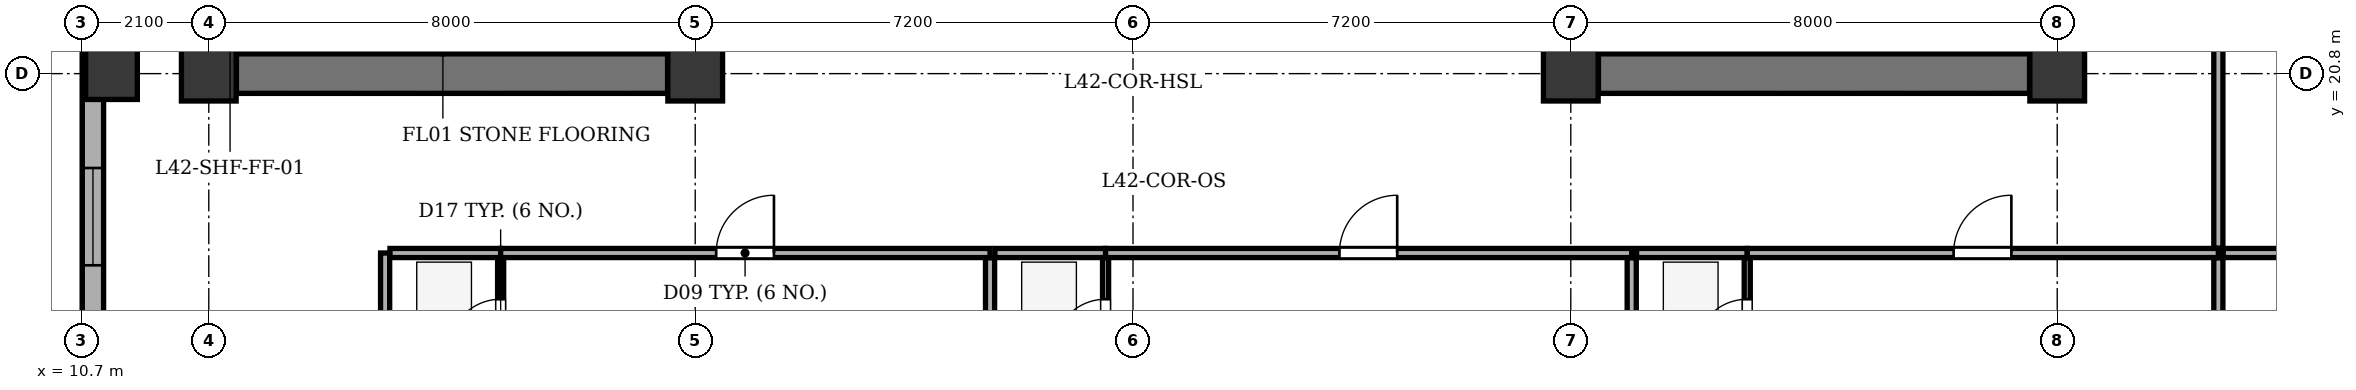
"""IFC4 building model, lengths in metres.
Left out: names, types, materials, properties, quantities, classifications, styles, units other than length and angle.
Written with IfcOpenShell. Run it as: python <this file> out.ifc"""

import sys

from ifc_helpers import new_model, si_unit, direction, frame, frame_2d, origin, origin_2d, place, context, subcontext, project, spatial, rectangle, extrude, element, fill, save


model = new_model("IFC4")
c1 = context("Model", 3, precision=1e-05, world=origin(), true_north=direction((0.0, 1.0)))
c2 = subcontext(c1, "Body", "Model", "MODEL_VIEW")
j1 = project(units=[si_unit("LENGTHUNIT", "METRE"), si_unit("PLANEANGLEUNIT", "RADIAN")], contexts=[c1])
p1 = place(None, origin())
s1 = spatial("IfcSite", under=j1, at=p1, CompositionType="ELEMENT")
p2 = place(p1, origin())
s2 = spatial("IfcBuilding", under=s1, at=p2, CompositionType="ELEMENT")
p3 = place(p2, frame((0.0, 0.0, 165.8)))
s3 = spatial("IfcBuildingStorey", under=s2, at=p3, CompositionType="ELEMENT", Elevation=165.8)
for number, where, z_axis, x_axis in (
    (1, (12.8, 20.8, 0.0), (0.0, 0.0, 1.0), (1.0, 0.0, 0.0)),
    (2, (20.8, 20.8, 0.0), (0.0, 0.0, 1.0), (1.0, 0.0, 0.0)),
    (3, (35.2, 20.8, 0.0), (0.0, 0.0, 1.0), (1.0, 0.0, 0.0)),
    (4, (43.2, 20.8, 0.0), (0.0, 0.0, 1.0), (1.0, 0.0, 0.0)),
):
    element("IfcColumn", number, at=place(p3, frame(where, z_axis=z_axis, x_axis=x_axis)), inside=s3, PredefinedType="COLUMN", context=c2, shape_type="SweptSolid", body=[
        extrude(rectangle(XDim=0.9, YDim=0.9, at=origin_2d()), origin(), (0.0, 0.0, 1.0), 3.5),
    ])
p4 = place(p3, frame((11.2, 20.8, 0.0), z_axis=(0.0, 0.0, 1.0), x_axis=(1.0, 0.0, 0.0)))
e5 = element("IfcColumn", 5, at=p4, inside=s3, PredefinedType="COLUMN", context=c2, shape_type="SweptSolid", body=[
    extrude(rectangle(XDim=0.85, YDim=0.85, at=origin_2d()), origin(), (0.0, 0.0, 1.0), 3.5),
])
p5 = place(p3, frame((10.895, 12.9, 0.0), z_axis=(0.0, 0.0, 1.0), x_axis=(0.0, 1.0, 0.0)))
e6 = element("IfcWall", 6, at=p5, inside=s3, PredefinedType="STANDARD", context=c2, shape_type="SweptSolid", body=[
    extrude(rectangle(XDim=35.0, YDim=0.35, at=frame_2d((17.5, 0.0))), origin(), (0.0, 0.0, 1.0), 2.785),
])
p6 = place(p5, frame((1.652, 0.0, 0.75)))
e7 = element("IfcOpeningElement", 7, at=p6, cuts=e6, PredefinedType="OPENING", context=c2, shape_type="SweptSolid", body=[
    extrude(rectangle(XDim=1.6, YDim=1.75, at=frame_2d((0.8, 0.875))), frame((0.0, 0.185, 0.0), z_axis=(0.0, -1.0, 0.0), x_axis=(1.0, 0.0, 0.0)), (0.0, 0.0, 1.0), 0.37),
])
p7 = place(p5, frame((4.748, 0.0, 0.75)))
e8 = element("IfcOpeningElement", 8, at=p7, cuts=e6, PredefinedType="OPENING", context=c2, shape_type="SweptSolid", body=[
    extrude(rectangle(XDim=1.6, YDim=1.75, at=frame_2d((0.8, 0.875))), frame((0.0, 0.185, 0.0), z_axis=(0.0, -1.0, 0.0), x_axis=(1.0, 0.0, 0.0)), (0.0, 0.0, 1.0), 0.37),
])
p8 = place(p5, frame((10.752, 0.0, 0.75)))
e9 = element("IfcOpeningElement", 9, at=p8, cuts=e6, PredefinedType="OPENING", context=c2, shape_type="SweptSolid", body=[
    extrude(rectangle(XDim=1.6, YDim=1.75, at=frame_2d((0.8, 0.875))), frame((0.0, 0.185, 0.0), z_axis=(0.0, -1.0, 0.0), x_axis=(1.0, 0.0, 0.0)), (0.0, 0.0, 1.0), 0.37),
])
p9 = place(p5, frame((15.998, 0.0, 0.75)))
e10 = element("IfcOpeningElement", 10, at=p9, cuts=e6, PredefinedType="OPENING", context=c2, shape_type="SweptSolid", body=[
    extrude(rectangle(XDim=2.1, YDim=1.75, at=frame_2d((1.05, 0.875))), frame((0.0, 0.185, 0.0), z_axis=(0.0, -1.0, 0.0), x_axis=(1.0, 0.0, 0.0)), (0.0, 0.0, 1.0), 0.37),
])
p10 = place(p5, frame((23.916, 0.0, 0.75)))
e11 = element("IfcOpeningElement", 11, at=p10, cuts=e6, PredefinedType="OPENING", context=c2, shape_type="SweptSolid", body=[
    extrude(rectangle(XDim=1.6, YDim=1.75, at=frame_2d((0.8, 0.875))), frame((0.0, 0.185, 0.0), z_axis=(0.0, -1.0, 0.0), x_axis=(1.0, 0.0, 0.0)), (0.0, 0.0, 1.0), 0.37),
])
p11 = place(p5, frame((29.834, 0.0, 0.75)))
e12 = element("IfcOpeningElement", 12, at=p11, cuts=e6, PredefinedType="OPENING", context=c2, shape_type="SweptSolid", body=[
    extrude(rectangle(XDim=2.1, YDim=1.75, at=frame_2d((1.05, 0.875))), frame((0.0, 0.185, 0.0), z_axis=(0.0, -1.0, 0.0), x_axis=(1.0, 0.0, 0.0)), (0.0, 0.0, 1.0), 0.37),
])
p12 = place(p3, frame((13.255, 20.8, 0.0), z_axis=(0.0, 0.0, 1.0), x_axis=(1.0, 0.0, 0.0)))
e13 = element("IfcWall", 13, at=p12, inside=s3, PredefinedType="SHEAR", context=c2, shape_type="SweptSolid", body=[
    extrude(rectangle(XDim=7.09, YDim=0.65, at=frame_2d((3.545, 0.0))), origin(), (0.0, 0.0, 1.0), 3.2),
])
p13 = place(p3, frame((16.435, 21.135, 0.0), z_axis=(0.0, 0.0, 1.0), x_axis=(0.0, 1.0, 0.0)))
e14 = element("IfcWall", 14, at=p13, inside=s3, PredefinedType="SHEAR", context=c2, shape_type="SweptSolid", body=[
    extrude(rectangle(XDim=12.13, YDim=0.25, at=frame_2d((6.065, 0.0))), origin(), (0.0, 0.0, 1.0), 3.2),
])
p14 = place(p13, frame((0.515, 0.0, 0.0)))
e15 = element("IfcOpeningElement", 15, at=p14, cuts=e14, PredefinedType="OPENING", context=c2, shape_type="SweptSolid", body=[
    extrude(rectangle(XDim=1.2, YDim=2.15, at=frame_2d((0.6, 1.075))), frame((0.0, 0.135, 0.0), z_axis=(0.0, -1.0, 0.0), x_axis=(1.0, 0.0, 0.0)), (0.0, 0.0, 1.0), 0.27),
])
p15 = place(p13, frame((2.665, 0.0, 0.0)))
e16 = element("IfcOpeningElement", 16, at=p15, cuts=e14, PredefinedType="OPENING", context=c2, shape_type="SweptSolid", body=[
    extrude(rectangle(XDim=1.15, YDim=2.15, at=frame_2d((0.575, 1.075))), frame((0.0, 0.135, 0.0), z_axis=(0.0, -1.0, 0.0), x_axis=(1.0, 0.0, 0.0)), (0.0, 0.0, 1.0), 0.27),
])
p16 = place(p3, frame((35.655, 20.8, 0.0), z_axis=(0.0, 0.0, 1.0), x_axis=(1.0, 0.0, 0.0)))
e17 = element("IfcWall", 17, at=p16, inside=s3, PredefinedType="SHEAR", context=c2, shape_type="SweptSolid", body=[
    extrude(rectangle(XDim=7.09, YDim=0.65, at=frame_2d((3.545, 0.0))), origin(), (0.0, 0.0, 1.0), 3.2),
])
p17 = place(p3, frame((39.565, 21.135, 0.0), z_axis=(0.0, 0.0, 1.0), x_axis=(0.0, 1.0, 0.0)))
e18 = element("IfcWall", 18, at=p17, inside=s3, PredefinedType="SHEAR", context=c2, shape_type="SweptSolid", body=[
    extrude(rectangle(XDim=12.13, YDim=0.25, at=frame_2d((6.065, 0.0))), origin(), (0.0, 0.0, 1.0), 3.2),
])
p18 = place(p17, frame((0.515, 0.0, 0.0)))
e19 = element("IfcOpeningElement", 19, at=p18, cuts=e18, PredefinedType="OPENING", context=c2, shape_type="SweptSolid", body=[
    extrude(rectangle(XDim=1.2, YDim=2.15, at=frame_2d((0.6, 1.075))), frame((0.0, 0.135, 0.0), z_axis=(0.0, -1.0, 0.0), x_axis=(1.0, 0.0, 0.0)), (0.0, 0.0, 1.0), 0.27),
])
p19 = place(p17, frame((2.665, 0.0, 0.0)))
e20 = element("IfcOpeningElement", 20, at=p19, cuts=e18, PredefinedType="OPENING", context=c2, shape_type="SweptSolid", body=[
    extrude(rectangle(XDim=1.15, YDim=2.15, at=frame_2d((0.575, 1.075))), frame((0.0, 0.135, 0.0), z_axis=(0.0, -1.0, 0.0), x_axis=(1.0, 0.0, 0.0)), (0.0, 0.0, 1.0), 0.27),
])
p20 = place(p3, frame((15.7, 8.275, 0.0), z_axis=(0.0, 0.0, 1.0), x_axis=(0.0, 1.0, 0.0)))
e21 = element("IfcWall", 21, at=p20, inside=s3, PredefinedType="PARTITIONING", context=c2, shape_type="SweptSolid", body=[
    extrude(rectangle(XDim=9.575, YDim=0.15, at=frame_2d((4.788, 0.0))), origin(), (0.0, 0.0, 1.0), 3.2),
])
p21 = place(p3, frame((15.78, 17.85, 0.0), z_axis=(0.0, 0.0, 1.0), x_axis=(1.0, 0.0, 0.0)))
e22 = element("IfcWall", 22, at=p21, inside=s3, PredefinedType="PARTITIONING", context=c2, shape_type="SweptSolid", body=[
    extrude(rectangle(XDim=1.82, YDim=0.15, at=frame_2d((0.91, 0.0))), origin(), (0.0, 0.0, 1.0), 3.2),
])
p22 = place(p3, frame((17.6, 17.85, 0.0), z_axis=(0.0, 0.0, 1.0), x_axis=(1.0, 0.0, 0.0)))
e23 = element("IfcWall", 23, at=p22, inside=s3, PredefinedType="PARTITIONING", context=c2, shape_type="SweptSolid", body=[
    extrude(rectangle(XDim=8.049, YDim=0.15, at=frame_2d((4.024, 0.0))), origin(), (0.0, 0.0, 1.0), 3.2),
])
p23 = place(p22, frame((3.545, 0.0, 0.0)))
e24 = element("IfcOpeningElement", 24, at=p23, cuts=e23, PredefinedType="OPENING", context=c2, shape_type="SweptSolid", body=[
    extrude(rectangle(XDim=0.95, YDim=2.1, at=frame_2d((0.475, 1.05))), frame((0.0, 0.085, 0.0), z_axis=(0.0, -1.0, 0.0), x_axis=(1.0, 0.0, 0.0)), (0.0, 0.0, 1.0), 0.17),
])
p24 = place(p3, frame((17.6, 15.52, 0.0), z_axis=(0.0, 0.0, 1.0), x_axis=(0.0, 1.0, 0.0)))
e25 = element("IfcWall", 25, at=p24, inside=s3, PredefinedType="PARTITIONING", context=c2, shape_type="SweptSolid", body=[
    extrude(rectangle(XDim=2.25, YDim=0.1, at=frame_2d((1.125, 0.0))), origin(), (0.0, 0.0, 1.0), 3.2),
])
p25 = place(p24, frame((0.72, 0.0, 0.0)))
e26 = element("IfcOpeningElement", 26, at=p25, cuts=e25, PredefinedType="OPENING", context=c2, shape_type="SweptSolid", body=[
    extrude(rectangle(XDim=0.85, YDim=2.05, at=frame_2d((0.425, 1.025))), frame((0.0, 0.06, 0.0), z_axis=(0.0, -1.0, 0.0), x_axis=(1.0, 0.0, 0.0)), (0.0, 0.0, 1.0), 0.12),
])
p26 = place(p3, frame((25.649, 8.275, 0.0), z_axis=(0.0, 0.0, 1.0), x_axis=(0.0, 1.0, 0.0)))
e27 = element("IfcWall", 27, at=p26, inside=s3, PredefinedType="PARTITIONING", context=c2, shape_type="SweptSolid", body=[
    extrude(rectangle(XDim=9.495, YDim=0.15, at=frame_2d((4.748, 0.0))), origin(), (0.0, 0.0, 1.0), 3.2),
])
p27 = place(p3, frame((25.729, 17.85, 0.0), z_axis=(0.0, 0.0, 1.0), x_axis=(1.0, 0.0, 0.0)))
e28 = element("IfcWall", 28, at=p27, inside=s3, PredefinedType="PARTITIONING", context=c2, shape_type="SweptSolid", body=[
    extrude(rectangle(XDim=1.82, YDim=0.15, at=frame_2d((0.91, 0.0))), origin(), (0.0, 0.0, 1.0), 3.2),
])
p28 = place(p3, frame((27.549, 17.85, 0.0), z_axis=(0.0, 0.0, 1.0), x_axis=(1.0, 0.0, 0.0)))
e29 = element("IfcWall", 29, at=p28, inside=s3, PredefinedType="PARTITIONING", context=c2, shape_type="SweptSolid", body=[
    extrude(rectangle(XDim=8.653, YDim=0.15, at=frame_2d((4.326, 0.0))), origin(), (0.0, 0.0, 1.0), 3.2),
])
p29 = place(p28, frame((3.846, 0.0, 0.0)))
e30 = element("IfcOpeningElement", 30, at=p29, cuts=e29, PredefinedType="OPENING", context=c2, shape_type="SweptSolid", body=[
    extrude(rectangle(XDim=0.95, YDim=2.1, at=frame_2d((0.475, 1.05))), frame((0.0, 0.085, 0.0), z_axis=(0.0, -1.0, 0.0), x_axis=(1.0, 0.0, 0.0)), (0.0, 0.0, 1.0), 0.17),
])
p30 = place(p3, frame((27.549, 15.52, 0.0), z_axis=(0.0, 0.0, 1.0), x_axis=(0.0, 1.0, 0.0)))
e31 = element("IfcWall", 31, at=p30, inside=s3, PredefinedType="PARTITIONING", context=c2, shape_type="SweptSolid", body=[
    extrude(rectangle(XDim=2.25, YDim=0.1, at=frame_2d((1.125, 0.0))), origin(), (0.0, 0.0, 1.0), 3.2),
])
p31 = place(p30, frame((0.72, 0.0, 0.0)))
e32 = element("IfcOpeningElement", 32, at=p31, cuts=e31, PredefinedType="OPENING", context=c2, shape_type="SweptSolid", body=[
    extrude(rectangle(XDim=0.85, YDim=2.05, at=frame_2d((0.425, 1.025))), frame((0.0, 0.06, 0.0), z_axis=(0.0, -1.0, 0.0), x_axis=(1.0, 0.0, 0.0)), (0.0, 0.0, 1.0), 0.12),
])
p32 = place(p3, frame((36.202, 8.275, 0.0), z_axis=(0.0, 0.0, 1.0), x_axis=(0.0, 1.0, 0.0)))
e33 = element("IfcWall", 33, at=p32, inside=s3, PredefinedType="PARTITIONING", context=c2, shape_type="SweptSolid", body=[
    extrude(rectangle(XDim=9.495, YDim=0.15, at=frame_2d((4.748, 0.0))), origin(), (0.0, 0.0, 1.0), 3.2),
])
p33 = place(p3, frame((36.282, 17.85, 0.0), z_axis=(0.0, 0.0, 1.0), x_axis=(1.0, 0.0, 0.0)))
e34 = element("IfcWall", 34, at=p33, inside=s3, PredefinedType="PARTITIONING", context=c2, shape_type="SweptSolid", body=[
    extrude(rectangle(XDim=1.82, YDim=0.15, at=frame_2d((0.91, 0.0))), origin(), (0.0, 0.0, 1.0), 3.2),
])
p34 = place(p3, frame((38.102, 17.85, 0.0), z_axis=(0.0, 0.0, 1.0), x_axis=(1.0, 0.0, 0.0)))
e35 = element("IfcWall", 35, at=p34, inside=s3, PredefinedType="PARTITIONING", context=c2, shape_type="SweptSolid", body=[
    extrude(rectangle(XDim=7.748, YDim=0.15, at=frame_2d((3.874, 0.0))), origin(), (0.0, 0.0, 1.0), 3.2),
])
p35 = place(p34, frame((3.394, 0.0, 0.0)))
e36 = element("IfcOpeningElement", 36, at=p35, cuts=e35, PredefinedType="OPENING", context=c2, shape_type="SweptSolid", body=[
    extrude(rectangle(XDim=0.95, YDim=2.1, at=frame_2d((0.475, 1.05))), frame((0.0, 0.085, 0.0), z_axis=(0.0, -1.0, 0.0), x_axis=(1.0, 0.0, 0.0)), (0.0, 0.0, 1.0), 0.17),
])
p36 = place(p3, frame((38.102, 15.52, 0.0), z_axis=(0.0, 0.0, 1.0), x_axis=(0.0, 1.0, 0.0)))
e37 = element("IfcWall", 37, at=p36, inside=s3, PredefinedType="PARTITIONING", context=c2, shape_type="SweptSolid", body=[
    extrude(rectangle(XDim=2.25, YDim=0.1, at=frame_2d((1.125, 0.0))), origin(), (0.0, 0.0, 1.0), 3.2),
])
p37 = place(p36, frame((0.72, 0.0, 0.0)))
e38 = element("IfcOpeningElement", 38, at=p37, cuts=e37, PredefinedType="OPENING", context=c2, shape_type="SweptSolid", body=[
    extrude(rectangle(XDim=0.85, YDim=2.05, at=frame_2d((0.425, 1.025))), frame((0.0, 0.06, 0.0), z_axis=(0.0, -1.0, 0.0), x_axis=(1.0, 0.0, 0.0)), (0.0, 0.0, 1.0), 0.12),
])
p38 = place(p3, frame((45.85, 8.275, 0.0), z_axis=(0.0, 0.0, 1.0), x_axis=(0.0, 1.0, 0.0)))
e39 = element("IfcWall", 39, at=p38, inside=s3, PredefinedType="PARTITIONING", context=c2, shape_type="SweptSolid", body=[
    extrude(rectangle(XDim=9.495, YDim=0.15, at=frame_2d((4.748, 0.0))), origin(), (0.0, 0.0, 1.0), 3.2),
])
p39 = place(p3, frame((45.93, 17.85, 0.0), z_axis=(0.0, 0.0, 1.0), x_axis=(1.0, 0.0, 0.0)))
e40 = element("IfcWall", 40, at=p39, inside=s3, PredefinedType="PARTITIONING", context=c2, shape_type="SweptSolid", body=[
    extrude(rectangle(XDim=9.395, YDim=0.15, at=frame_2d((4.698, 0.0))), origin(), (0.0, 0.0, 1.0), 3.2),
])
p40 = place(p3, frame((45.85, 17.93, 0.0), z_axis=(0.0, 0.0, 1.0), x_axis=(0.0, 1.0, 0.0)))
e41 = element("IfcWall", 41, at=p40, inside=s3, PredefinedType="PARTITIONING", context=c2, shape_type="SweptSolid", body=[
    extrude(rectangle(XDim=18.54, YDim=0.15, at=frame_2d((9.27, 0.0))), origin(), (0.0, 0.0, 1.0), 3.2),
])
p41 = place(p40, frame((8.79, 0.0, 0.0)))
e42 = element("IfcOpeningElement", 42, at=p41, cuts=e41, PredefinedType="OPENING", context=c2, shape_type="SweptSolid", body=[
    extrude(rectangle(XDim=0.95, YDim=2.1, at=frame_2d((0.475, 1.05))), frame((0.0, 0.085, 0.0), z_axis=(0.0, -1.0, 0.0), x_axis=(1.0, 0.0, 0.0)), (0.0, 0.0, 1.0), 0.17),
])
p42 = place(p7, origin())
e43 = element("IfcWindow", 43, at=p42, inside=s3, PartitioningType="SINGLE_PANEL", PredefinedType="WINDOW", context=c2, shape_type="SweptSolid", body=[
    extrude(rectangle(XDim=1.6, YDim=1.75, at=frame_2d((0.8, 0.875))), frame((0.0, -0.01, 0.0), z_axis=(0.0, -1.0, 0.0), x_axis=(1.0, 0.0, 0.0)), (0.0, 0.0, 1.0), 0.06),
])
fill(e8, e43)
p43 = place(p25, origin())
e44 = element("IfcDoor", 44, at=p43, inside=s3, OperationType="SINGLE_SWING_LEFT", PredefinedType="DOOR", context=c2, shape_type="SweptSolid", body=[
    extrude(rectangle(XDim=0.85, YDim=2.05, at=frame_2d((0.425, 1.025))), frame((0.0, 0.025, 0.0), z_axis=(0.0, -1.0, 0.0), x_axis=(1.0, 0.0, 0.0)), (0.0, 0.0, 1.0), 0.05),
])
fill(e26, e44)
p44 = place(p23, origin())
e45 = element("IfcDoor", 45, at=p44, inside=s3, OperationType="SINGLE_SWING_RIGHT", PredefinedType="DOOR", context=c2, shape_type="SweptSolid", body=[
    extrude(rectangle(XDim=0.95, YDim=2.1, at=frame_2d((0.475, 1.05))), frame((0.0, 0.025, 0.0), z_axis=(0.0, -1.0, 0.0), x_axis=(1.0, 0.0, 0.0)), (0.0, 0.0, 1.0), 0.05),
])
fill(e24, e45)
p45 = place(p31, origin())
e46 = element("IfcDoor", 46, at=p45, inside=s3, OperationType="SINGLE_SWING_LEFT", PredefinedType="DOOR", context=c2, shape_type="SweptSolid", body=[
    extrude(rectangle(XDim=0.85, YDim=2.05, at=frame_2d((0.425, 1.025))), frame((0.0, 0.025, 0.0), z_axis=(0.0, -1.0, 0.0), x_axis=(1.0, 0.0, 0.0)), (0.0, 0.0, 1.0), 0.05),
])
fill(e32, e46)
p46 = place(p29, origin())
e47 = element("IfcDoor", 47, at=p46, inside=s3, OperationType="SINGLE_SWING_RIGHT", PredefinedType="DOOR", context=c2, shape_type="SweptSolid", body=[
    extrude(rectangle(XDim=0.95, YDim=2.1, at=frame_2d((0.475, 1.05))), frame((0.0, 0.025, 0.0), z_axis=(0.0, -1.0, 0.0), x_axis=(1.0, 0.0, 0.0)), (0.0, 0.0, 1.0), 0.05),
])
fill(e30, e47)
p47 = place(p37, origin())
e48 = element("IfcDoor", 48, at=p47, inside=s3, OperationType="SINGLE_SWING_LEFT", PredefinedType="DOOR", context=c2, shape_type="SweptSolid", body=[
    extrude(rectangle(XDim=0.85, YDim=2.05, at=frame_2d((0.425, 1.025))), frame((0.0, 0.025, 0.0), z_axis=(0.0, -1.0, 0.0), x_axis=(1.0, 0.0, 0.0)), (0.0, 0.0, 1.0), 0.05),
])
fill(e38, e48)
p48 = place(p35, origin())
e49 = element("IfcDoor", 49, at=p48, inside=s3, OperationType="SINGLE_SWING_RIGHT", PredefinedType="DOOR", context=c2, shape_type="SweptSolid", body=[
    extrude(rectangle(XDim=0.95, YDim=2.1, at=frame_2d((0.475, 1.05))), frame((0.0, 0.025, 0.0), z_axis=(0.0, -1.0, 0.0), x_axis=(1.0, 0.0, 0.0)), (0.0, 0.0, 1.0), 0.05),
])
fill(e36, e49)
save(model, sys.argv[1])
